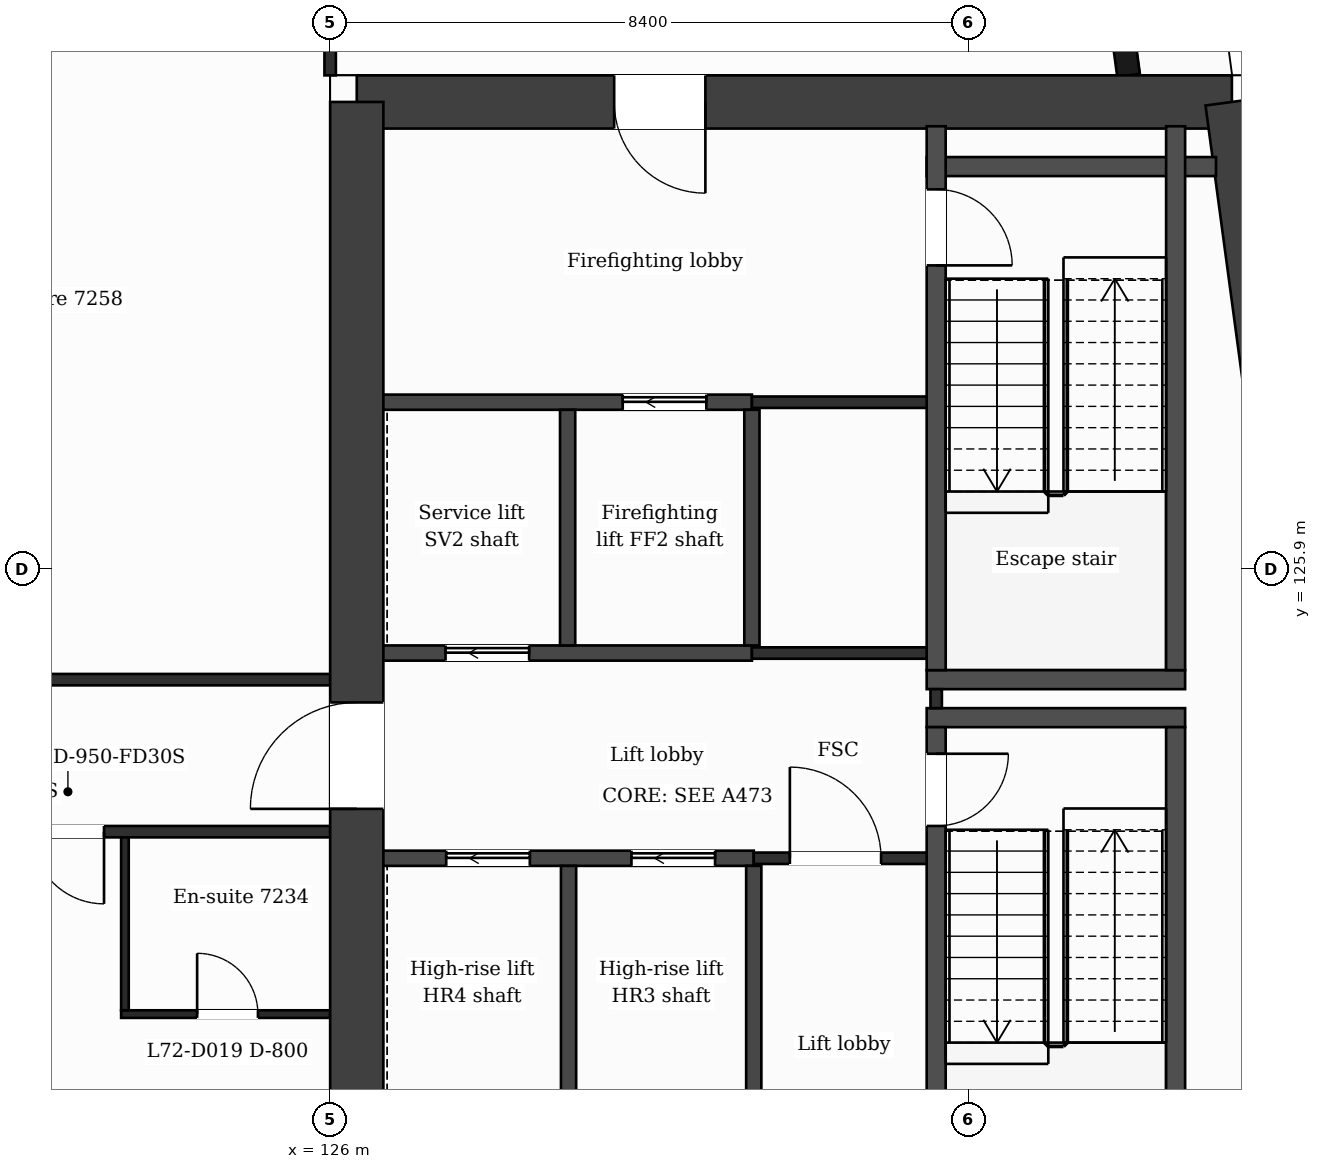
"""IFC4 building model, lengths in metres.
Left out: names, types, materials, properties, quantities, classifications, styles, units other than length and angle.
Written with IfcOpenShell. Run it as: python <this file> out.ifc"""

import sys

from ifc_helpers import new_model, si_unit, direction, frame, frame_2d, origin, place, context, subcontext, project, spatial, rectangle, extrude, element, fill, save


model = new_model("IFC4")
c1 = context("Model", 3, precision=1e-05, world=origin(), true_north=direction((0.0, 1.0)))
c2 = subcontext(c1, "Body", "Model", "MODEL_VIEW")
j1 = project(units=[si_unit("LENGTHUNIT", "METRE"), si_unit("PLANEANGLEUNIT", "RADIAN")], contexts=[c1])
p1 = place(None, origin())
s1 = spatial("IfcSite", under=j1, at=p1, CompositionType="ELEMENT")
p2 = place(p1, origin())
s2 = spatial("IfcBuilding", under=s1, at=p2, CompositionType="ELEMENT")
p3 = place(p2, frame((0.0, 0.0, 296.0)))
s3 = spatial("IfcBuildingStorey", under=s2, at=p3, CompositionType="ELEMENT", Elevation=296.0)
p4 = place(p3, frame((126.35, 132.05, 0.0), z_axis=(0.0, 0.0, 1.0), x_axis=(1.0, 0.0, 0.0)))
e1 = element("IfcWall", 1, at=p4, inside=s3, PredefinedType="SHEAR", context=c2, shape_type="SweptSolid", body=[
    extrude(rectangle(XDim=11.513, YDim=0.7, at=frame_2d((5.757, 0.0))), origin(), (0.0, 0.0, 1.0), 3.7),
])
p5 = place(p4, frame((3.386, 0.0, 0.0)))
e2 = element("IfcOpeningElement", 2, at=p5, cuts=e1, PredefinedType="OPENING", context=c2, shape_type="SweptSolid", body=[
    extrude(rectangle(XDim=1.2, YDim=2.1, at=frame_2d((0.6, 1.05))), frame((0.0, 0.36, 0.0), z_axis=(0.0, -1.0, 0.0), x_axis=(1.0, 0.0, 0.0)), (0.0, 0.0, 1.0), 0.72),
])
p6 = place(p3, frame((137.863, 132.05, 0.0), z_axis=(0.0, 0.0, 1.0), x_axis=(0.133401241494, -0.991062111458, 0.0)))
e3 = element("IfcWall", 3, at=p6, inside=s3, PredefinedType="SHEAR", context=c2, shape_type="SweptSolid", body=[
    extrude(rectangle(XDim=15.842, YDim=0.7, at=frame_2d((7.921, 0.0))), origin(), (0.0, 0.0, 1.0), 3.7),
])
p7 = place(p3, frame((126.35, 116.35, 0.0), z_axis=(0.0, 0.0, 1.0), x_axis=(0.0, 1.0, 0.0)))
e4 = element("IfcWall", 4, at=p7, inside=s3, PredefinedType="SHEAR", context=c2, shape_type="SweptSolid", body=[
    extrude(rectangle(XDim=15.7, YDim=0.7, at=frame_2d((7.85, 0.0))), origin(), (0.0, 0.0, 1.0), 3.7),
])
p8 = place(p7, frame((6.4, 0.0, 0.0)))
e5 = element("IfcOpeningElement", 5, at=p8, cuts=e4, PredefinedType="OPENING", context=c2, shape_type="SweptSolid", body=[
    extrude(rectangle(XDim=1.4, YDim=2.1, at=frame_2d((0.7, 1.05))), frame((0.0, 0.36, 0.0), z_axis=(0.0, -1.0, 0.0), x_axis=(1.0, 0.0, 0.0)), (0.0, 0.0, 1.0), 0.72),
])
p9 = place(p3, frame((136.504, 132.4, 0.0), z_axis=(0.0, 0.0, 1.0), x_axis=(-0.133399697462, 0.99106231929, 0.0)))
e6 = element("IfcWall", 6, at=p9, inside=s3, PredefinedType="SOLIDWALL", context=c2, shape_type="SweptSolid", body=[
    extrude(rectangle(XDim=6.74, YDim=0.3, at=frame_2d((3.37, 0.0))), origin(), (0.0, 0.0, 1.0), 3.38),
])
p10 = place(p9, frame((1.115, 0.0, 0.0)))
e7 = element("IfcOpeningElement", 7, at=p10, cuts=e6, PredefinedType="OPENING", context=c2, shape_type="SweptSolid", body=[
    extrude(rectangle(XDim=1.2, YDim=2.4, at=frame_2d((0.6, 1.2))), frame((0.0, 0.16, 0.0), z_axis=(0.0, -1.0, 0.0), x_axis=(1.0, 0.0, 0.0)), (0.0, 0.0, 1.0), 0.32),
])
p11 = place(p9, frame((3.835, 0.0, 0.9)))
e8 = element("IfcOpeningElement", 8, at=p11, cuts=e6, PredefinedType="OPENING", context=c2, shape_type="SweptSolid", body=[
    extrude(rectangle(XDim=2.4, YDim=2.1, at=frame_2d((1.2, 1.05))), frame((0.0, 0.16, 0.0), z_axis=(0.0, -1.0, 0.0), x_axis=(1.0, 0.0, 0.0)), (0.0, 0.0, 1.0), 0.32),
])
p12 = place(p3, frame((123.25, 120.05, 0.0), z_axis=(0.0, 0.0, 1.0), x_axis=(1.0, 0.0, 0.0)))
e9 = element("IfcWall", 9, at=p12, inside=s3, PredefinedType="PARTITIONING", context=c2, shape_type="SweptSolid", body=[
    extrude(rectangle(XDim=2.75, YDim=0.1, at=frame_2d((1.375, 0.0))), origin(), (0.0, 0.0, 1.0), 3.38),
])
p13 = place(p12, frame((1.0, 0.0, 0.0)))
e10 = element("IfcOpeningElement", 10, at=p13, cuts=e9, PredefinedType="OPENING", context=c2, shape_type="SweptSolid", body=[
    extrude(rectangle(XDim=0.8, YDim=2.1, at=frame_2d((0.4, 1.05))), frame((0.0, 0.06, 0.0), z_axis=(0.0, -1.0, 0.0), x_axis=(1.0, 0.0, 0.0)), (0.0, 0.0, 1.0), 0.12),
])
p14 = place(p3, frame((126.7, 122.1, 0.0), z_axis=(0.0, 0.0, 1.0), x_axis=(1.0, 0.0, 0.0)))
e11 = element("IfcWall", 11, at=p14, inside=s3, PredefinedType="PARTITIONING", context=c2, shape_type="SweptSolid", body=[
    extrude(rectangle(XDim=4.873, YDim=0.2, at=frame_2d((2.437, 0.0))), origin(), (0.0, 0.0, 1.0), 3.38),
])
p15 = place(p14, frame((3.264, 0.0, 0.0)))
e12 = element("IfcOpeningElement", 12, at=p15, cuts=e11, PredefinedType="OPENING", context=c2, shape_type="SweptSolid", body=[
    extrude(rectangle(XDim=1.1, YDim=2.1, at=frame_2d((0.55, 1.05))), frame((0.0, 0.11, 0.0), z_axis=(0.0, -1.0, 0.0), x_axis=(1.0, 0.0, 0.0)), (0.0, 0.0, 1.0), 0.22),
])
p16 = place(p14, frame((0.827, 0.0, 0.0)))
e13 = element("IfcOpeningElement", 13, at=p16, cuts=e11, PredefinedType="OPENING", context=c2, shape_type="SweptSolid", body=[
    extrude(rectangle(XDim=1.1, YDim=2.1, at=frame_2d((0.55, 1.05))), frame((0.0, 0.11, 0.0), z_axis=(0.0, -1.0, 0.0), x_axis=(1.0, 0.0, 0.0)), (0.0, 0.0, 1.0), 0.22),
])
p17 = place(p3, frame((131.573, 122.1, 0.0), z_axis=(0.0, 0.0, 1.0), x_axis=(1.0, 0.0, 0.0)))
e14 = element("IfcWall", 14, at=p17, inside=s3, PredefinedType="PARTITIONING", context=c2, shape_type="SweptSolid", body=[
    extrude(rectangle(XDim=2.4, YDim=0.15, at=frame_2d((1.2, 0.0))), origin(), (0.0, 0.0, 1.0), 3.38),
])
p18 = place(p17, frame((0.475, 0.0, 0.0)))
e15 = element("IfcOpeningElement", 15, at=p18, cuts=e14, PredefinedType="OPENING", context=c2, shape_type="SweptSolid", body=[
    extrude(rectangle(XDim=1.2, YDim=2.1, at=frame_2d((0.6, 1.05))), frame((0.0, 0.085, 0.0), z_axis=(0.0, -1.0, 0.0), x_axis=(1.0, 0.0, 0.0)), (0.0, 0.0, 1.0), 0.17),
])
p19 = place(p3, frame((100.8, 122.45, 0.0), z_axis=(0.0, 0.0, 1.0), x_axis=(1.0, 0.0, 0.0)))
e16 = element("IfcWall", 16, at=p19, inside=s3, PredefinedType="PARTITIONING", context=c2, shape_type="SweptSolid", body=[
    extrude(rectangle(XDim=25.2, YDim=0.15, at=frame_2d((12.6, 0.0))), origin(), (0.0, 0.0, 1.0), 3.38),
])
p20 = place(p19, frame((1.6, 0.0, 0.0)))
e17 = element("IfcOpeningElement", 17, at=p20, cuts=e16, PredefinedType="OPENING", context=c2, shape_type="SweptSolid", body=[
    extrude(rectangle(XDim=1.0, YDim=2.1, at=frame_2d((0.5, 1.05))), frame((0.0, 0.085, 0.0), z_axis=(0.0, -1.0, 0.0), x_axis=(1.0, 0.0, 0.0)), (0.0, 0.0, 1.0), 0.17),
])
p21 = place(p19, frame((11.12, 0.0, 0.0)))
e18 = element("IfcOpeningElement", 18, at=p21, cuts=e16, PredefinedType="OPENING", context=c2, shape_type="SweptSolid", body=[
    extrude(rectangle(XDim=0.95, YDim=2.1, at=frame_2d((0.475, 1.05))), frame((0.0, 0.085, 0.0), z_axis=(0.0, -1.0, 0.0), x_axis=(1.0, 0.0, 0.0)), (0.0, 0.0, 1.0), 0.17),
])
p22 = place(p19, frame((13.05, 0.0, 0.0)))
e19 = element("IfcOpeningElement", 19, at=p22, cuts=e16, PredefinedType="OPENING", context=c2, shape_type="SweptSolid", body=[
    extrude(rectangle(XDim=1.0, YDim=2.1, at=frame_2d((0.5, 1.05))), frame((0.0, 0.085, 0.0), z_axis=(0.0, -1.0, 0.0), x_axis=(1.0, 0.0, 0.0)), (0.0, 0.0, 1.0), 0.17),
])
p23 = place(p19, frame((19.61, 0.0, 0.0)))
e20 = element("IfcOpeningElement", 20, at=p23, cuts=e16, PredefinedType="OPENING", context=c2, shape_type="SweptSolid", body=[
    extrude(rectangle(XDim=0.95, YDim=2.1, at=frame_2d((0.475, 1.05))), frame((0.0, 0.085, 0.0), z_axis=(0.0, -1.0, 0.0), x_axis=(1.0, 0.0, 0.0)), (0.0, 0.0, 1.0), 0.17),
])
p24 = place(p19, frame((21.275, 0.0, 0.0)))
e21 = element("IfcOpeningElement", 21, at=p24, cuts=e16, PredefinedType="OPENING", context=c2, shape_type="SweptSolid", body=[
    extrude(rectangle(XDim=0.95, YDim=2.1, at=frame_2d((0.475, 1.05))), frame((0.0, 0.085, 0.0), z_axis=(0.0, -1.0, 0.0), x_axis=(1.0, 0.0, 0.0)), (0.0, 0.0, 1.0), 0.17),
])
for number, where, z_axis, x_axis in (
    (22, (133.848, 123.95, 0.0), (0.0, 0.0, 1.0), (1.0, 0.0, 0.0)),
    (23, (133.848, 124.45, 0.0), (0.0, 0.0, 1.0), (1.0, 0.0, 0.0)),
):
    element("IfcWall", number, at=place(p3, frame(where, z_axis=z_axis, x_axis=x_axis)), inside=s3, PredefinedType="PARTITIONING", context=c2, shape_type="SweptSolid", body=[
        extrude(rectangle(XDim=3.4, YDim=0.25, at=frame_2d((1.7, 0.0))), origin(), (0.0, 0.0, 1.0), 3.38),
    ])
p25 = place(p3, frame((100.8, 124.45, 0.0), z_axis=(0.0, 0.0, 1.0), x_axis=(1.0, 0.0, 0.0)))
e24 = element("IfcWall", 24, at=p25, inside=s3, PredefinedType="PARTITIONING", context=c2, shape_type="SweptSolid", body=[
    extrude(rectangle(XDim=25.2, YDim=0.15, at=frame_2d((12.6, 0.0))), origin(), (0.0, 0.0, 1.0), 3.38),
])
p26 = place(p25, frame((1.85, 0.0, 0.0)))
e25 = element("IfcOpeningElement", 25, at=p26, cuts=e24, PredefinedType="OPENING", context=c2, shape_type="SweptSolid", body=[
    extrude(rectangle(XDim=1.0, YDim=2.1, at=frame_2d((0.5, 1.05))), frame((0.0, 0.085, 0.0), z_axis=(0.0, -1.0, 0.0), x_axis=(1.0, 0.0, 0.0)), (0.0, 0.0, 1.0), 0.17),
])
p27 = place(p25, frame((6.425, 0.0, 0.0)))
e26 = element("IfcOpeningElement", 26, at=p27, cuts=e24, PredefinedType="OPENING", context=c2, shape_type="SweptSolid", body=[
    extrude(rectangle(XDim=1.0, YDim=2.1, at=frame_2d((0.5, 1.05))), frame((0.0, 0.085, 0.0), z_axis=(0.0, -1.0, 0.0), x_axis=(1.0, 0.0, 0.0)), (0.0, 0.0, 1.0), 0.17),
])
p28 = place(p25, frame((9.4, 0.0, 0.0)))
e27 = element("IfcOpeningElement", 27, at=p28, cuts=e24, PredefinedType="OPENING", context=c2, shape_type="SweptSolid", body=[
    extrude(rectangle(XDim=1.0, YDim=2.1, at=frame_2d((0.5, 1.05))), frame((0.0, 0.085, 0.0), z_axis=(0.0, -1.0, 0.0), x_axis=(1.0, 0.0, 0.0)), (0.0, 0.0, 1.0), 0.17),
])
p29 = place(p25, frame((14.825, 0.0, 0.0)))
e28 = element("IfcOpeningElement", 28, at=p29, cuts=e24, PredefinedType="OPENING", context=c2, shape_type="SweptSolid", body=[
    extrude(rectangle(XDim=1.0, YDim=2.1, at=frame_2d((0.5, 1.05))), frame((0.0, 0.085, 0.0), z_axis=(0.0, -1.0, 0.0), x_axis=(1.0, 0.0, 0.0)), (0.0, 0.0, 1.0), 0.17),
])
p30 = place(p25, frame((18.825, 0.0, 0.0)))
e29 = element("IfcOpeningElement", 29, at=p30, cuts=e24, PredefinedType="OPENING", context=c2, shape_type="SweptSolid", body=[
    extrude(rectangle(XDim=1.0, YDim=2.1, at=frame_2d((0.5, 1.05))), frame((0.0, 0.085, 0.0), z_axis=(0.0, -1.0, 0.0), x_axis=(1.0, 0.0, 0.0)), (0.0, 0.0, 1.0), 0.17),
])
p31 = place(p3, frame((126.7, 124.8, 0.0), z_axis=(0.0, 0.0, 1.0), x_axis=(1.0, 0.0, 0.0)))
e30 = element("IfcWall", 30, at=p31, inside=s3, PredefinedType="PARTITIONING", context=c2, shape_type="SweptSolid", body=[
    extrude(rectangle(XDim=4.849, YDim=0.2, at=frame_2d((2.424, 0.0))), origin(), (0.0, 0.0, 1.0), 3.38),
])
p32 = place(p31, frame((0.818, 0.0, 0.0)))
e31 = element("IfcOpeningElement", 31, at=p32, cuts=e30, PredefinedType="OPENING", context=c2, shape_type="SweptSolid", body=[
    extrude(rectangle(XDim=1.1, YDim=2.1, at=frame_2d((0.55, 1.05))), frame((0.0, 0.11, 0.0), z_axis=(0.0, -1.0, 0.0), x_axis=(1.0, 0.0, 0.0)), (0.0, 0.0, 1.0), 0.22),
])
p33 = place(p3, frame((131.549, 124.8, 0.0), z_axis=(0.0, 0.0, 1.0), x_axis=(1.0, 0.0, 0.0)))
e32 = element("IfcWall", 32, at=p33, inside=s3, PredefinedType="PARTITIONING", context=c2, shape_type="SweptSolid", body=[
    extrude(rectangle(XDim=2.549, YDim=0.15, at=frame_2d((1.275, 0.0))), origin(), (0.0, 0.0, 1.0), 3.38),
])
p34 = place(p3, frame((126.7, 128.1, 0.0), z_axis=(0.0, 0.0, 1.0), x_axis=(1.0, 0.0, 0.0)))
e33 = element("IfcWall", 33, at=p34, inside=s3, PredefinedType="PARTITIONING", context=c2, shape_type="SweptSolid", body=[
    extrude(rectangle(XDim=4.849, YDim=0.2, at=frame_2d((2.424, 0.0))), origin(), (0.0, 0.0, 1.0), 3.38),
])
p35 = place(p34, frame((3.149, 0.0, 0.0)))
e34 = element("IfcOpeningElement", 34, at=p35, cuts=e33, PredefinedType="OPENING", context=c2, shape_type="SweptSolid", body=[
    extrude(rectangle(XDim=1.1, YDim=2.1, at=frame_2d((0.55, 1.05))), frame((0.0, 0.11, 0.0), z_axis=(0.0, -1.0, 0.0), x_axis=(1.0, 0.0, 0.0)), (0.0, 0.0, 1.0), 0.22),
])
p36 = place(p3, frame((131.549, 128.1, 0.0), z_axis=(0.0, 0.0, 1.0), x_axis=(1.0, 0.0, 0.0)))
e35 = element("IfcWall", 35, at=p36, inside=s3, PredefinedType="PARTITIONING", context=c2, shape_type="SweptSolid", body=[
    extrude(rectangle(XDim=2.424, YDim=0.15, at=frame_2d((1.212, 0.0))), origin(), (0.0, 0.0, 1.0), 3.38),
])
p37 = place(p3, frame((133.848, 131.2, 0.0), z_axis=(0.0, 0.0, 1.0), x_axis=(1.0, 0.0, 0.0)))
e36 = element("IfcWall", 36, at=p37, inside=s3, PredefinedType="PARTITIONING", context=c2, shape_type="SweptSolid", body=[
    extrude(rectangle(XDim=3.807, YDim=0.25, at=frame_2d((1.903, 0.0))), origin(), (0.0, 0.0, 1.0), 3.38),
])
p38 = place(p3, frame((123.3, 120.1, 0.0), z_axis=(0.0, 0.0, 1.0), x_axis=(0.0, 1.0, 0.0)))
e37 = element("IfcWall", 37, at=p38, inside=s3, PredefinedType="PARTITIONING", context=c2, shape_type="SweptSolid", body=[
    extrude(rectangle(XDim=2.275, YDim=0.1, at=frame_2d((1.137, 0.0))), origin(), (0.0, 0.0, 1.0), 3.38),
])
p39 = place(p3, frame((126.0, 132.4, 0.0), z_axis=(0.0, 0.0, 1.0), x_axis=(0.0, 1.0, 0.0)))
e38 = element("IfcWall", 38, at=p39, inside=s3, PredefinedType="PARTITIONING", context=c2, shape_type="SweptSolid", body=[
    extrude(rectangle(XDim=1.325, YDim=0.15, at=frame_2d((0.663, 0.0))), origin(), (0.0, 0.0, 1.0), 3.38),
])
for number, where, z_axis, x_axis in (
    (39, (129.124, 124.9, 0.0), (0.0, 0.0, 1.0), (0.0, 1.0, 0.0)),
    (40, (129.136, 118.9, 0.0), (0.0, 0.0, 1.0), (0.0, 1.0, 0.0)),
    (41, (131.549, 124.9, 0.0), (0.0, 0.0, 1.0), (0.0, 1.0, 0.0)),
):
    element("IfcWall", number, at=place(p3, frame(where, z_axis=z_axis, x_axis=x_axis)), inside=s3, PredefinedType="PARTITIONING", context=c2, shape_type="SweptSolid", body=[
        extrude(rectangle(XDim=3.1, YDim=0.2, at=frame_2d((1.55, 0.0))), origin(), (0.0, 0.0, 1.0), 3.38),
    ])
p40 = place(p3, frame((131.573, 116.67, 0.0), z_axis=(0.0, 0.0, 1.0), x_axis=(0.0, 1.0, 0.0)))
e42 = element("IfcWall", 42, at=p40, inside=s3, PredefinedType="PARTITIONING", context=c2, shape_type="SweptSolid", body=[
    extrude(rectangle(XDim=5.33, YDim=0.2, at=frame_2d((2.665, 0.0))), origin(), (0.0, 0.0, 1.0), 3.38),
])
p41 = place(p40, frame((0.88, 0.0, 0.0)))
e43 = element("IfcOpeningElement", 43, at=p41, cuts=e42, PredefinedType="OPENING", context=c2, shape_type="SweptSolid", body=[
    extrude(rectangle(XDim=0.9, YDim=2.1, at=frame_2d((0.45, 1.05))), frame((0.0, 0.11, 0.0), z_axis=(0.0, -1.0, 0.0), x_axis=(1.0, 0.0, 0.0)), (0.0, 0.0, 1.0), 0.22),
])
p42 = place(p3, frame((133.973, 124.075, 0.0), z_axis=(0.0, 0.0, 1.0), x_axis=(0.0, 1.0, 0.0)))
e44 = element("IfcWall", 44, at=p42, inside=s3, PredefinedType="PARTITIONING", context=c2, shape_type="SweptSolid", body=[
    extrude(rectangle(XDim=0.25, YDim=0.15, at=frame_2d((0.125, 0.0))), origin(), (0.0, 0.0, 1.0), 3.38),
])
p43 = place(p3, frame((133.973, 116.67, 0.0), z_axis=(0.0, 0.0, 1.0), x_axis=(0.0, 1.0, 0.0)))
e45 = element("IfcWall", 45, at=p43, inside=s3, PredefinedType="PARTITIONING", context=c2, shape_type="SweptSolid", body=[
    extrude(rectangle(XDim=7.155, YDim=0.25, at=frame_2d((3.578, 0.0))), origin(), (0.0, 0.0, 1.0), 3.38),
])
p44 = place(p43, frame((5.855, 0.0, 0.0)))
e46 = element("IfcOpeningElement", 46, at=p44, cuts=e45, PredefinedType="OPENING", context=c2, shape_type="SweptSolid", body=[
    extrude(rectangle(XDim=0.95, YDim=2.1, at=frame_2d((0.475, 1.05))), frame((0.0, 0.135, 0.0), z_axis=(0.0, -1.0, 0.0), x_axis=(1.0, 0.0, 0.0)), (0.0, 0.0, 1.0), 0.27),
])
p45 = place(p3, frame((133.973, 124.575, 0.0), z_axis=(0.0, 0.0, 1.0), x_axis=(0.0, 1.0, 0.0)))
e47 = element("IfcWall", 47, at=p45, inside=s3, PredefinedType="PARTITIONING", context=c2, shape_type="SweptSolid", body=[
    extrude(rectangle(XDim=7.155, YDim=0.25, at=frame_2d((3.578, 0.0))), origin(), (0.0, 0.0, 1.0), 3.38),
])
p46 = place(p45, frame((5.325, 0.0, 0.0)))
e48 = element("IfcOpeningElement", 48, at=p46, cuts=e47, PredefinedType="OPENING", context=c2, shape_type="SweptSolid", body=[
    extrude(rectangle(XDim=1.0, YDim=2.1, at=frame_2d((0.5, 1.05))), frame((0.0, 0.135, 0.0), z_axis=(0.0, -1.0, 0.0), x_axis=(1.0, 0.0, 0.0)), (0.0, 0.0, 1.0), 0.27),
])
for number, where, z_axis, x_axis in (
    (49, (137.123, 116.67, 0.0), (0.0, 0.0, 1.0), (0.0, 1.0, 0.0)),
    (50, (137.123, 124.575, 0.0), (0.0, 0.0, 1.0), (0.0, 1.0, 0.0)),
):
    element("IfcWall", number, at=place(p3, frame(where, z_axis=z_axis, x_axis=x_axis)), inside=s3, PredefinedType="PARTITIONING", context=c2, shape_type="SweptSolid", body=[
        extrude(rectangle(XDim=7.155, YDim=0.25, at=frame_2d((3.578, 0.0))), origin(), (0.0, 0.0, 1.0), 3.38),
    ])
p47 = place(p18, origin())
e51 = element("IfcDoor", 51, at=p47, inside=s3, OperationType="SINGLE_SWING_LEFT", PredefinedType="DOOR", context=c2, shape_type="SweptSolid", body=[
    extrude(rectangle(XDim=1.2, YDim=2.1, at=frame_2d((0.6, 1.05))), frame((0.0, 0.025, 0.0), z_axis=(0.0, -1.0, 0.0), x_axis=(1.0, 0.0, 0.0)), (0.0, 0.0, 1.0), 0.05),
])
fill(e15, e51)
p48 = place(p15, origin())
e52 = element("IfcDoor", 52, at=p48, inside=s3, OperationType="SLIDING_TO_LEFT", PredefinedType="DOOR", context=c2, shape_type="SweptSolid", body=[
    extrude(rectangle(XDim=1.1, YDim=2.1, at=frame_2d((0.55, 1.05))), frame((0.0, 0.025, 0.0), z_axis=(0.0, -1.0, 0.0), x_axis=(1.0, 0.0, 0.0)), (0.0, 0.0, 1.0), 0.05),
])
fill(e12, e52)
p49 = place(p16, origin())
e53 = element("IfcDoor", 53, at=p49, inside=s3, OperationType="SLIDING_TO_LEFT", PredefinedType="DOOR", context=c2, shape_type="SweptSolid", body=[
    extrude(rectangle(XDim=1.1, YDim=2.1, at=frame_2d((0.55, 1.05))), frame((0.0, 0.025, 0.0), z_axis=(0.0, -1.0, 0.0), x_axis=(1.0, 0.0, 0.0)), (0.0, 0.0, 1.0), 0.05),
])
fill(e13, e53)
p50 = place(p35, origin())
e54 = element("IfcDoor", 54, at=p50, inside=s3, OperationType="SLIDING_TO_LEFT", PredefinedType="DOOR", context=c2, shape_type="SweptSolid", body=[
    extrude(rectangle(XDim=1.1, YDim=2.1, at=frame_2d((0.55, 1.05))), frame((0.0, 0.025, 0.0), z_axis=(0.0, -1.0, 0.0), x_axis=(1.0, 0.0, 0.0)), (0.0, 0.0, 1.0), 0.05),
])
fill(e34, e54)
p51 = place(p32, origin())
e55 = element("IfcDoor", 55, at=p51, inside=s3, OperationType="SLIDING_TO_LEFT", PredefinedType="DOOR", context=c2, shape_type="SweptSolid", body=[
    extrude(rectangle(XDim=1.1, YDim=2.1, at=frame_2d((0.55, 1.05))), frame((0.0, 0.025, 0.0), z_axis=(0.0, -1.0, 0.0), x_axis=(1.0, 0.0, 0.0)), (0.0, 0.0, 1.0), 0.05),
])
fill(e31, e55)
p52 = place(p44, origin())
e56 = element("IfcDoor", 56, at=p52, inside=s3, OperationType="SINGLE_SWING_RIGHT", PredefinedType="DOOR", context=c2, shape_type="SweptSolid", body=[
    extrude(rectangle(XDim=0.95, YDim=2.1, at=frame_2d((0.475, 1.05))), frame((0.0, 0.025, 0.0), z_axis=(0.0, -1.0, 0.0), x_axis=(1.0, 0.0, 0.0)), (0.0, 0.0, 1.0), 0.05),
])
fill(e46, e56)
p53 = place(p46, origin())
e57 = element("IfcDoor", 57, at=p53, inside=s3, OperationType="SINGLE_SWING_LEFT", PredefinedType="DOOR", context=c2, shape_type="SweptSolid", body=[
    extrude(rectangle(XDim=1.0, YDim=2.1, at=frame_2d((0.5, 1.05))), frame((0.0, 0.025, 0.0), z_axis=(0.0, -1.0, 0.0), x_axis=(1.0, 0.0, 0.0)), (0.0, 0.0, 1.0), 0.05),
])
fill(e48, e57)
p54 = place(p24, origin())
e58 = element("IfcDoor", 58, at=p54, inside=s3, OperationType="SINGLE_SWING_RIGHT", PredefinedType="DOOR", context=c2, shape_type="SweptSolid", body=[
    extrude(rectangle(XDim=0.95, YDim=2.1, at=frame_2d((0.475, 1.05))), frame((0.0, 0.025, 0.0), z_axis=(0.0, -1.0, 0.0), x_axis=(1.0, 0.0, 0.0)), (0.0, 0.0, 1.0), 0.05),
])
fill(e21, e58)
p55 = place(p13, origin())
e59 = element("IfcDoor", 59, at=p55, inside=s3, OperationType="SINGLE_SWING_LEFT", PredefinedType="DOOR", context=c2, shape_type="SweptSolid", body=[
    extrude(rectangle(XDim=0.8, YDim=2.1, at=frame_2d((0.4, 1.05))), frame((0.0, 0.025, 0.0), z_axis=(0.0, -1.0, 0.0), x_axis=(1.0, 0.0, 0.0)), (0.0, 0.0, 1.0), 0.05),
])
fill(e10, e59)
p56 = place(p5, origin())
e60 = element("IfcDoor", 60, at=p56, inside=s3, OperationType="SINGLE_SWING_RIGHT", PredefinedType="DOOR", context=c2, shape_type="SweptSolid", body=[
    extrude(rectangle(XDim=1.2, YDim=2.1, at=frame_2d((0.6, 1.05))), frame((0.0, 0.025, 0.0), z_axis=(0.0, -1.0, 0.0), x_axis=(1.0, 0.0, 0.0)), (0.0, 0.0, 1.0), 0.05),
])
fill(e2, e60)
p57 = place(p8, origin())
e61 = element("IfcDoor", 61, at=p57, inside=s3, OperationType="SINGLE_SWING_LEFT", PredefinedType="DOOR", context=c2, shape_type="SweptSolid", body=[
    extrude(rectangle(XDim=1.4, YDim=2.1, at=frame_2d((0.7, 1.05))), frame((0.0, 0.025, 0.0), z_axis=(0.0, -1.0, 0.0), x_axis=(1.0, 0.0, 0.0)), (0.0, 0.0, 1.0), 0.05),
])
fill(e5, e61)
save(model, sys.argv[1])
